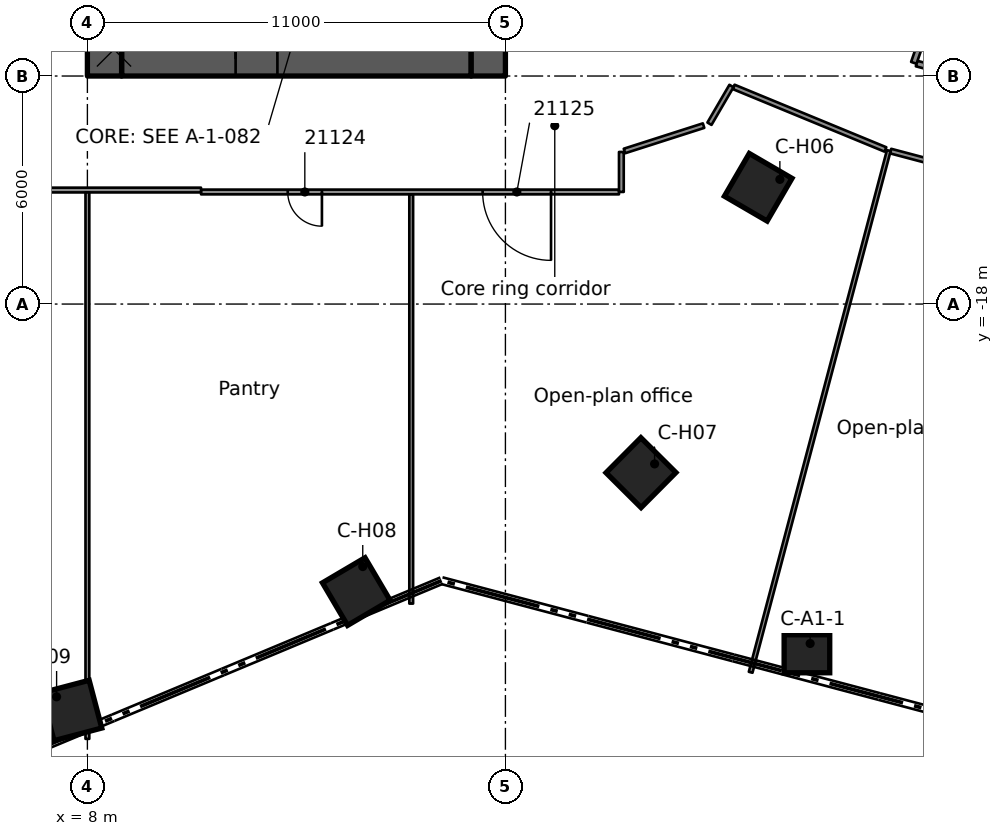
"""IFC4 building model, lengths in metres.
Left out: names, types, materials, properties, quantities, classifications, styles, units other than length and angle.
Written with IfcOpenShell. Run it as: python <this file> out.ifc"""

import sys

from ifc_helpers import new_model, si_unit, direction, frame, frame_2d, origin, origin_2d, place, context, subcontext, project, spatial, rectangle, extrude, element, fill, save


model = new_model("IFC4")
c1 = context("Model", 3, precision=1e-05, world=origin(), true_north=direction((0.0, 1.0)))
c2 = subcontext(c1, "Body", "Model", "MODEL_VIEW")
j1 = project(units=[si_unit("LENGTHUNIT", "METRE"), si_unit("PLANEANGLEUNIT", "RADIAN")], contexts=[c1])
p1 = place(None, origin())
s1 = spatial("IfcSite", under=j1, at=p1, CompositionType="ELEMENT")
p2 = place(p1, origin())
s2 = spatial("IfcBuilding", under=s1, at=p2, CompositionType="ELEMENT")
p3 = place(p2, frame((0.0, 0.0, 105.7)))
s3 = spatial("IfcBuildingStorey", under=s2, at=p3, CompositionType="ELEMENT", Elevation=105.7)
p4 = place(p3, frame((8.9, -11.55, 0.0), z_axis=(0.0, 0.0, 1.0), x_axis=(1.0, 0.0, 0.0)))
e1 = element("IfcWall", 1, at=p4, inside=s3, PredefinedType="SHEAR", context=c2, shape_type="SweptSolid", body=[
    extrude(rectangle(XDim=9.2, YDim=0.9, at=frame_2d((4.6, 0.0))), origin(), (0.0, 0.0, 1.0), 3.5),
])
p5 = place(p4, frame((3.0, 0.0, 0.0)))
e2 = element("IfcOpeningElement", 2, at=p5, cuts=e1, PredefinedType="OPENING", context=c2, shape_type="SweptSolid", body=[
    extrude(rectangle(XDim=1.1, YDim=2.1, at=frame_2d((0.55, 1.05))), frame((0.0, 0.46, 0.0), z_axis=(0.0, -1.0, 0.0), x_axis=(1.0, 0.0, 0.0)), (0.0, 0.0, 1.0), 0.92),
])
p6 = place(p3, frame((8.45, -12.0, 0.0), z_axis=(0.0, 0.0, 1.0), x_axis=(0.0, 1.0, 0.0)))
e3 = element("IfcWall", 3, at=p6, inside=s3, PredefinedType="SHEAR", context=c2, shape_type="SweptSolid", body=[
    extrude(rectangle(XDim=24.0, YDim=0.9, at=frame_2d((12.0, 0.0))), origin(), (0.0, 0.0, 1.0), 3.5),
])
p7 = place(p6, frame((12.6, 0.0, 0.0)))
e4 = element("IfcOpeningElement", 4, at=p7, cuts=e3, PredefinedType="OPENING", context=c2, shape_type="SweptSolid", body=[
    extrude(rectangle(XDim=1.8, YDim=2.1, at=frame_2d((0.9, 1.05))), frame((0.0, 0.46, 0.0), z_axis=(0.0, -1.0, 0.0), x_axis=(1.0, 0.0, 0.0)), (0.0, 0.0, 1.0), 0.92),
])
p8 = place(p6, frame((3.25, 0.0, 0.0)))
e5 = element("IfcOpeningElement", 5, at=p8, cuts=e3, PredefinedType="OPENING", context=c2, shape_type="SweptSolid", body=[
    extrude(rectangle(XDim=1.1, YDim=2.1, at=frame_2d((0.55, 1.05))), frame((0.0, 0.46, 0.0), z_axis=(0.0, -1.0, 0.0), x_axis=(1.0, 0.0, 0.0)), (0.0, 0.0, 1.0), 0.92),
])
p9 = place(p3, frame((18.55, -12.0, 0.0), z_axis=(0.0, 0.0, 1.0), x_axis=(0.0, 1.0, 0.0)))
e6 = element("IfcWall", 6, at=p9, inside=s3, PredefinedType="SHEAR", context=c2, shape_type="SweptSolid", body=[
    extrude(rectangle(XDim=24.0, YDim=0.9, at=frame_2d((12.0, 0.0))), origin(), (0.0, 0.0, 1.0), 3.5),
])
p10 = place(p9, frame((12.1, 0.0, 0.0)))
e7 = element("IfcOpeningElement", 7, at=p10, cuts=e6, PredefinedType="OPENING", context=c2, shape_type="SweptSolid", body=[
    extrude(rectangle(XDim=1.8, YDim=2.1, at=frame_2d((0.9, 1.05))), frame((0.0, 0.46, 0.0), z_axis=(0.0, -1.0, 0.0), x_axis=(1.0, 0.0, 0.0)), (0.0, 0.0, 1.0), 0.92),
])
p11 = place(p3, frame((26.934, -27.202, 0.0), z_axis=(0.0, 0.0, 1.0), x_axis=(1.0, 0.0, 0.0)))
e8 = element("IfcColumn", 8, at=p11, inside=s3, PredefinedType="COLUMN", context=c2, shape_type="SweptSolid", body=[
    extrude(rectangle(XDim=1.2, YDim=1.0, at=origin_2d()), origin(), (0.0, 0.0, 1.0), 3.5),
])
for number, where, z_axis, x_axis in (
    (9, (25.652, -14.927, 0.0), (0.0, 0.0, 1.0), (0.864, -0.503, 0.0)),
    (10, (22.567, -22.436, 0.0), (0.0, 0.0, 1.0), (0.709, -0.705, 0.0)),
    (11, (15.076, -25.565, 0.0), (0.0, 0.0, 1.0), (0.508, -0.861, 0.0)),
    (12, (7.584, -28.694, 0.0), (0.0, 0.0, 1.0), (0.256, -0.967, 0.0)),
):
    element("IfcColumn", number, at=place(p3, frame(where, z_axis=z_axis, x_axis=x_axis)), inside=s3, PredefinedType="COLUMN", context=c2, shape_type="SweptSolid", body=[
        extrude(rectangle(XDim=1.3, YDim=1.3, at=origin_2d()), origin(), (0.0, 0.0, 1.0), 3.5),
    ])
p12 = place(p3, frame((25.006, -12.286, 0.0), z_axis=(0.0, 0.0, 1.0), x_axis=(0.924527003777, -0.38111654292, 0.0)))
e13 = element("IfcWall", 13, at=p12, inside=s3, PredefinedType="PARTITIONING", context=c2, shape_type="SweptSolid", body=[
    extrude(rectangle(XDim=4.319, YDim=0.125, at=frame_2d((2.159, 0.0))), origin(), (0.0, 0.0, 1.0), 3.08),
])
p13 = place(p3, frame((53.007, -20.299, 0.0), z_axis=(0.0, 0.0, 1.0), x_axis=(-0.966653562273, 0.256087661835, 0.0)))
e14 = element("IfcWall", 14, at=p13, inside=s3, PredefinedType="PARTITIONING", context=c2, shape_type="SweptSolid", body=[
    extrude(rectangle(XDim=24.695, YDim=0.125, at=frame_2d((12.347, 0.0))), origin(), (0.0, 0.0, 1.0), 3.08),
])
p14 = place(p13, frame((2.287, 0.0, 0.0)))
e15 = element("IfcOpeningElement", 15, at=p14, cuts=e14, PredefinedType="OPENING", context=c2, shape_type="SweptSolid", body=[
    extrude(rectangle(XDim=0.9, YDim=2.1, at=frame_2d((0.45, 1.05))), frame((0.0, 0.073, 0.0), z_axis=(0.0, -1.0, 0.0), x_axis=(1.0, 0.0, 0.0)), (0.0, 0.0, 1.0), 0.145),
])
p15 = place(p13, frame((21.69, 0.0, 0.0)))
e16 = element("IfcOpeningElement", 16, at=p15, cuts=e14, PredefinedType="OPENING", context=c2, shape_type="SweptSolid", body=[
    extrude(rectangle(XDim=1.1, YDim=2.1, at=frame_2d((0.55, 1.05))), frame((0.0, 0.073, 0.0), z_axis=(0.0, -1.0, 0.0), x_axis=(1.0, 0.0, 0.0)), (0.0, 0.0, 1.0), 0.145),
])
p16 = place(p13, frame((16.538, 0.0, 0.0)))
e17 = element("IfcOpeningElement", 17, at=p16, cuts=e14, PredefinedType="OPENING", context=c2, shape_type="SweptSolid", body=[
    extrude(rectangle(XDim=1.1, YDim=2.1, at=frame_2d((0.55, 1.05))), frame((0.0, 0.073, 0.0), z_axis=(0.0, -1.0, 0.0), x_axis=(1.0, 0.0, 0.0)), (0.0, 0.0, 1.0), 0.145),
])
p17 = place(p13, frame((9.137, 0.0, 0.0)))
e18 = element("IfcOpeningElement", 18, at=p17, cuts=e14, PredefinedType="OPENING", context=c2, shape_type="SweptSolid", body=[
    extrude(rectangle(XDim=1.8, YDim=2.1, at=frame_2d((0.9, 1.05))), frame((0.0, 0.073, 0.0), z_axis=(0.0, -1.0, 0.0), x_axis=(1.0, 0.0, 0.0)), (0.0, 0.0, 1.0), 0.145),
])
p18 = place(p3, frame((29.819, -11.672, 0.0), z_axis=(0.0, 0.0, 1.0), x_axis=(0.966680429276, -0.255986225517, 0.0)))
e19 = element("IfcWall", 19, at=p18, inside=s3, PredefinedType="PARTITIONING", context=c2, shape_type="SweptSolid", body=[
    extrude(rectangle(XDim=21.922, YDim=0.15, at=frame_2d((10.961, 0.0))), origin(), (0.0, 0.0, 1.0), 3.08),
])
p19 = place(p18, frame((14.287, 0.0, 0.0)))
e20 = element("IfcOpeningElement", 20, at=p19, cuts=e19, PredefinedType="OPENING", context=c2, shape_type="SweptSolid", body=[
    extrude(rectangle(XDim=0.9, YDim=2.1, at=frame_2d((0.45, 1.05))), frame((0.0, 0.085, 0.0), z_axis=(0.0, -1.0, 0.0), x_axis=(1.0, 0.0, 0.0)), (0.0, 0.0, 1.0), 0.17),
])
p20 = place(p3, frame((21.988, -15.051, 0.0), z_axis=(0.0, 0.0, 1.0), x_axis=(-1.0, 0.0, 0.0)))
e21 = element("IfcWall", 21, at=p20, inside=s3, PredefinedType="PARTITIONING", context=c2, shape_type="SweptSolid", body=[
    extrude(rectangle(XDim=10.997, YDim=0.125, at=frame_2d((5.499, 0.0))), origin(), (0.0, 0.0, 1.0), 3.08),
])
p21 = place(p20, frame((7.816, 0.0, 0.0)))
e22 = element("IfcOpeningElement", 22, at=p21, cuts=e21, PredefinedType="OPENING", context=c2, shape_type="SweptSolid", body=[
    extrude(rectangle(XDim=0.9, YDim=2.1, at=frame_2d((0.45, 1.05))), frame((0.0, 0.073, 0.0), z_axis=(0.0, -1.0, 0.0), x_axis=(1.0, 0.0, 0.0)), (0.0, 0.0, 1.0), 0.145),
])
p22 = place(p20, frame((1.788, 0.0, 0.0)))
e23 = element("IfcOpeningElement", 23, at=p22, cuts=e21, PredefinedType="OPENING", context=c2, shape_type="SweptSolid", body=[
    extrude(rectangle(XDim=1.8, YDim=2.1, at=frame_2d((0.9, 1.05))), frame((0.0, 0.073, 0.0), z_axis=(0.0, -1.0, 0.0), x_axis=(1.0, 0.0, 0.0)), (0.0, 0.0, 1.0), 0.145),
])
p23 = place(p3, frame((10.99, -15.0, 0.0), z_axis=(0.0, 0.0, 1.0), x_axis=(-1.0, 0.0, 0.0)))
e24 = element("IfcWall", 24, at=p23, inside=s3, PredefinedType="PARTITIONING", context=c2, shape_type="SweptSolid", body=[
    extrude(rectangle(XDim=20.458, YDim=0.125, at=frame_2d((10.229, 0.0))), origin(), (0.0, 0.0, 1.0), 3.08),
])
p24 = place(p23, frame((15.574, 0.0, 0.0)))
e25 = element("IfcOpeningElement", 25, at=p24, cuts=e24, PredefinedType="OPENING", context=c2, shape_type="SweptSolid", body=[
    extrude(rectangle(XDim=0.9, YDim=2.1, at=frame_2d((0.45, 1.05))), frame((0.0, 0.073, 0.0), z_axis=(0.0, -1.0, 0.0), x_axis=(1.0, 0.0, 0.0)), (0.0, 0.0, 1.0), 0.145),
])
p25 = place(p23, frame((6.34, 0.0, 0.0)))
e26 = element("IfcOpeningElement", 26, at=p25, cuts=e24, PredefinedType="OPENING", context=c2, shape_type="SweptSolid", body=[
    extrude(rectangle(XDim=1.8, YDim=2.1, at=frame_2d((0.9, 1.05))), frame((0.0, 0.073, 0.0), z_axis=(0.0, -1.0, 0.0), x_axis=(1.0, 0.0, 0.0)), (0.0, 0.0, 1.0), 0.145),
])
p26 = place(p3, frame((22.133, -13.972, 0.0), z_axis=(0.0, 0.0, 1.0), x_axis=(0.952283953223, 0.30521348665, 0.0)))
e27 = element("IfcWall", 27, at=p26, inside=s3, PredefinedType="PARTITIONING", context=c2, shape_type="SweptSolid", body=[
    extrude(rectangle(XDim=2.185, YDim=0.125, at=frame_2d((1.093, 0.0))), origin(), (0.0, 0.0, 1.0), 3.08),
])
p27 = place(p3, frame((24.369, -13.255, 0.0), z_axis=(0.0, 0.0, 1.0), x_axis=(0.503804993987, 0.863817415913, 0.0)))
e28 = element("IfcWall", 28, at=p27, inside=s3, PredefinedType="PARTITIONING", context=c2, shape_type="SweptSolid", body=[
    extrude(rectangle(XDim=1.149, YDim=0.125, at=frame_2d((0.575, 0.0))), origin(), (0.0, 0.0, 1.0), 3.08),
])
p28 = place(p3, frame((29.746, -11.653, 0.0), z_axis=(0.0, 0.0, 1.0), x_axis=(0.326055233701, 0.945350720408, 0.0)))
e29 = element("IfcWall", 29, at=p28, inside=s3, PredefinedType="PARTITIONING", context=c2, shape_type="SweptSolid", body=[
    extrude(rectangle(XDim=0.699, YDim=0.15, at=frame_2d((0.35, 0.0))), origin(), (0.0, 0.0, 1.0), 3.08),
])
p29 = place(p3, frame((25.453, -27.689, 0.0), z_axis=(0.0, 0.0, 1.0), x_axis=(0.255983290364, 0.966681206528, 0.0)))
e30 = element("IfcWall", 30, at=p29, inside=s3, PredefinedType="PARTITIONING", context=c2, shape_type="SweptSolid", body=[
    extrude(rectangle(XDim=14.2, YDim=0.1, at=frame_2d((7.1, 0.0))), origin(), (0.0, 0.0, 1.0), 3.08),
])
p30 = place(p3, frame((22.051, -15.05, 0.0), z_axis=(0.0, 0.0, 1.0), x_axis=(0.0, 1.0, 0.0)))
e31 = element("IfcWall", 31, at=p30, inside=s3, PredefinedType="PARTITIONING", context=c2, shape_type="SweptSolid", body=[
    extrude(rectangle(XDim=1.052, YDim=0.125, at=frame_2d((0.526, 0.0))), origin(), (0.0, 0.0, 1.0), 3.08),
])
p31 = place(p3, frame((16.521, -25.882, 0.0), z_axis=(0.0, 0.0, 1.0), x_axis=(0.0, 1.0, 0.0)))
e32 = element("IfcWall", 32, at=p31, inside=s3, PredefinedType="PARTITIONING", context=c2, shape_type="SweptSolid", body=[
    extrude(rectangle(XDim=10.768, YDim=0.1, at=frame_2d((5.384, 0.0))), origin(), (0.0, 0.0, 1.0), 3.08),
])
p32 = place(p3, frame((8.0, -29.441, 0.0), z_axis=(0.0, 0.0, 1.0), x_axis=(0.0, 1.0, 0.0)))
e33 = element("IfcWall", 33, at=p32, inside=s3, PredefinedType="PARTITIONING", context=c2, shape_type="SweptSolid", body=[
    extrude(rectangle(XDim=14.378, YDim=0.1, at=frame_2d((7.189, 0.0))), origin(), (0.0, 0.0, 1.0), 3.08),
])
p33 = place(p5, origin())
e34 = element("IfcDoor", 34, at=p33, inside=s3, OperationType="SINGLE_SWING_LEFT", PredefinedType="DOOR", context=c2, shape_type="SweptSolid", body=[
    extrude(rectangle(XDim=1.1, YDim=2.1, at=frame_2d((0.55, 1.05))), frame((0.0, 0.025, 0.0), z_axis=(0.0, -1.0, 0.0), x_axis=(1.0, 0.0, 0.0)), (0.0, 0.0, 1.0), 0.05),
])
fill(e2, e34)
p34 = place(p21, origin())
e35 = element("IfcDoor", 35, at=p34, inside=s3, OperationType="SINGLE_SWING_RIGHT", PredefinedType="DOOR", context=c2, shape_type="SweptSolid", body=[
    extrude(rectangle(XDim=0.9, YDim=2.1, at=frame_2d((0.45, 1.05))), frame((0.0, 0.025, 0.0), z_axis=(0.0, -1.0, 0.0), x_axis=(1.0, 0.0, 0.0)), (0.0, 0.0, 1.0), 0.05),
])
fill(e22, e35)
p35 = place(p22, origin())
e36 = element("IfcDoor", 36, at=p35, inside=s3, OperationType="DOUBLE_DOOR_SINGLE_SWING", PredefinedType="DOOR", context=c2, shape_type="SweptSolid", body=[
    extrude(rectangle(XDim=1.8, YDim=2.1, at=frame_2d((0.9, 1.05))), frame((0.0, 0.025, 0.0), z_axis=(0.0, -1.0, 0.0), x_axis=(1.0, 0.0, 0.0)), (0.0, 0.0, 1.0), 0.05),
])
fill(e23, e36)
save(model, sys.argv[1])
